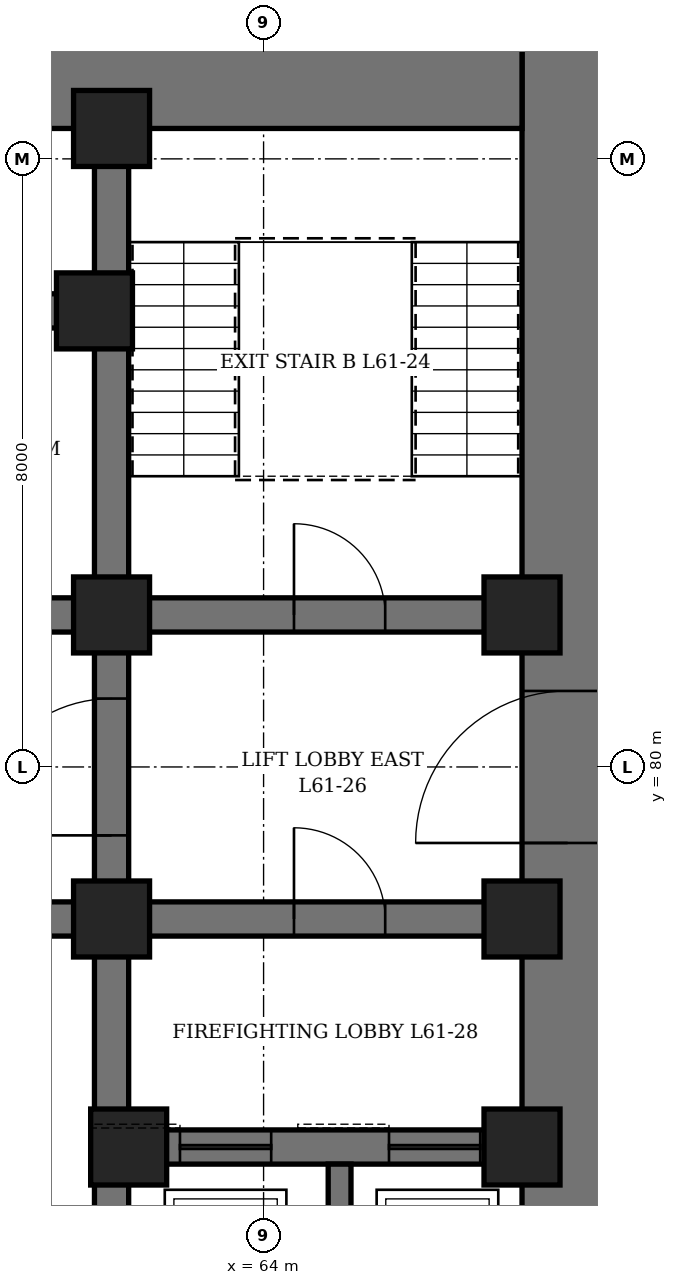
"""IFC4 building model, lengths in metres.
Left out: names, types, materials, properties, quantities, classifications, styles, units other than length and angle.
Written with IfcOpenShell. Run it as: python <this file> out.ifc"""

import sys

from ifc_helpers import new_model, si_unit, direction, frame, frame_2d, origin, origin_2d, place, context, subcontext, project, spatial, rectangle, hollow_rectangle, extrude, element, fill, save


model = new_model("IFC4")
c1 = context("Model", 3, precision=1e-05, world=origin(), true_north=direction((0.0, 1.0)))
c2 = subcontext(c1, "Body", "Model", "MODEL_VIEW")
j1 = project(units=[si_unit("LENGTHUNIT", "METRE"), si_unit("PLANEANGLEUNIT", "RADIAN")], contexts=[c1])
p1 = place(None, origin())
s1 = spatial("IfcSite", under=j1, at=p1, CompositionType="ELEMENT")
p2 = place(p1, origin())
s2 = spatial("IfcBuilding", under=s1, at=p2, CompositionType="ELEMENT")
p3 = place(p2, frame((0.0, 0.0, 271.3)))
s3 = spatial("IfcBuildingStorey", under=s2, at=p3, CompositionType="ELEMENT", Elevation=271.3)
p4 = place(p3, frame((68.0, 70.4, 0.0), z_axis=(0.0, 0.0, 1.0), x_axis=(0.0, 1.0, 0.0)))
e1 = element("IfcWall", 1, at=p4, inside=s3, PredefinedType="SHEAR", context=c2, shape_type="SweptSolid", body=[
    extrude(rectangle(XDim=19.2, YDim=1.2, at=frame_2d((9.6, 0.0))), origin(), (0.0, 0.0, 1.0), 4.2),
])
p5 = place(p4, frame((8.6, 0.0, 0.0)))
e2 = element("IfcOpeningElement", 2, at=p5, cuts=e1, PredefinedType="OPENING", context=c2, shape_type="SweptSolid", body=[
    extrude(rectangle(XDim=2.0, YDim=2.4, at=frame_2d((1.0, 1.2))), frame((0.0, 0.61, 0.0), z_axis=(0.0, -1.0, 0.0), x_axis=(1.0, 0.0, 0.0)), (0.0, 0.0, 1.0), 1.22),
])
p6 = place(p3, frame((44.6, 89.0, 0.0), z_axis=(0.0, 0.0, 1.0), x_axis=(1.0, 0.0, 0.0)))
e3 = element("IfcWall", 3, at=p6, inside=s3, PredefinedType="SHEAR", context=c2, shape_type="SweptSolid", body=[
    extrude(rectangle(XDim=22.8, YDim=1.2, at=frame_2d((11.4, 0.0))), origin(), (0.0, 0.0, 1.0), 4.2),
])
p7 = place(p6, frame((6.525, 0.0, 0.0)))
e4 = element("IfcOpeningElement", 4, at=p7, cuts=e3, PredefinedType="OPENING", context=c2, shape_type="SweptSolid", body=[
    extrude(rectangle(XDim=1.0, YDim=2.1, at=frame_2d((0.5, 1.05))), frame((0.0, 0.61, 0.0), z_axis=(0.0, -1.0, 0.0), x_axis=(1.0, 0.0, 0.0)), (0.0, 0.0, 1.0), 1.22),
])
p8 = place(p6, frame((9.45, 0.0, 0.0)))
e5 = element("IfcOpeningElement", 5, at=p8, cuts=e3, PredefinedType="OPENING", context=c2, shape_type="SweptSolid", body=[
    extrude(rectangle(XDim=0.9, YDim=2.1, at=frame_2d((0.45, 1.05))), frame((0.0, 0.61, 0.0), z_axis=(0.0, -1.0, 0.0), x_axis=(1.0, 0.0, 0.0)), (0.0, 0.0, 1.0), 1.22),
])
p9 = place(p6, frame((13.012, 0.0, 0.0)))
e6 = element("IfcOpeningElement", 6, at=p9, cuts=e3, PredefinedType="OPENING", context=c2, shape_type="SweptSolid", body=[
    extrude(rectangle(XDim=0.9, YDim=2.1, at=frame_2d((0.45, 1.05))), frame((0.0, 0.61, 0.0), z_axis=(0.0, -1.0, 0.0), x_axis=(1.0, 0.0, 0.0)), (0.0, 0.0, 1.0), 1.22),
])
p10 = place(p3, frame((62.0, 71.6, 0.0), z_axis=(0.0, 0.0, 1.0), x_axis=(0.0, 1.0, 0.0)))
e7 = element("IfcWall", 7, at=p10, inside=s3, PredefinedType="SHEAR", context=c2, shape_type="SweptSolid", body=[
    extrude(rectangle(XDim=16.8, YDim=0.45, at=frame_2d((8.4, 0.0))), origin(), (0.0, 0.0, 1.0), 4.2),
])
p11 = place(p10, frame((7.5, 0.0, 0.0)))
e8 = element("IfcOpeningElement", 8, at=p11, cuts=e7, PredefinedType="OPENING", context=c2, shape_type="SweptSolid", body=[
    extrude(rectangle(XDim=1.8, YDim=2.4, at=frame_2d((0.9, 1.2))), frame((0.0, 0.235, 0.0), z_axis=(0.0, -1.0, 0.0), x_axis=(1.0, 0.0, 0.0)), (0.0, 0.0, 1.0), 0.47),
])
p12 = place(p3, frame((62.225, 75.0, 0.0), z_axis=(0.0, 0.0, 1.0), x_axis=(1.0, 0.0, 0.0)))
e9 = element("IfcWall", 9, at=p12, inside=s3, PredefinedType="SHEAR", context=c2, shape_type="SweptSolid", body=[
    extrude(rectangle(XDim=5.175, YDim=0.45, at=frame_2d((2.587, 0.0))), origin(), (0.0, 0.0, 1.0), 4.2),
])
p13 = place(p12, frame((0.675, 0.0, 0.0)))
e10 = element("IfcOpeningElement", 10, at=p13, cuts=e9, PredefinedType="OPENING", context=c2, shape_type="SweptSolid", body=[
    extrude(rectangle(XDim=1.2, YDim=2.2, at=frame_2d((0.6, 1.1))), frame((0.0, 0.235, 0.0), z_axis=(0.0, -1.0, 0.0), x_axis=(1.0, 0.0, 0.0)), (0.0, 0.0, 1.0), 0.47),
])
p14 = place(p12, frame((3.425, 0.0, 0.0)))
e11 = element("IfcOpeningElement", 11, at=p14, cuts=e9, PredefinedType="OPENING", context=c2, shape_type="SweptSolid", body=[
    extrude(rectangle(XDim=1.2, YDim=2.2, at=frame_2d((0.6, 1.1))), frame((0.0, 0.235, 0.0), z_axis=(0.0, -1.0, 0.0), x_axis=(1.0, 0.0, 0.0)), (0.0, 0.0, 1.0), 0.47),
])
p15 = place(p3, frame((62.225, 78.0, 0.0), z_axis=(0.0, 0.0, 1.0), x_axis=(1.0, 0.0, 0.0)))
e12 = element("IfcWall", 12, at=p15, inside=s3, PredefinedType="SHEAR", context=c2, shape_type="SweptSolid", body=[
    extrude(rectangle(XDim=5.175, YDim=0.45, at=frame_2d((2.587, 0.0))), origin(), (0.0, 0.0, 1.0), 4.2),
])
p16 = place(p15, frame((2.175, 0.0, 0.0)))
e13 = element("IfcOpeningElement", 13, at=p16, cuts=e12, PredefinedType="OPENING", context=c2, shape_type="SweptSolid", body=[
    extrude(rectangle(XDim=1.2, YDim=2.1, at=frame_2d((0.6, 1.05))), frame((0.0, 0.235, 0.0), z_axis=(0.0, -1.0, 0.0), x_axis=(1.0, 0.0, 0.0)), (0.0, 0.0, 1.0), 0.47),
])
p17 = place(p3, frame((62.225, 82.0, 0.0), z_axis=(0.0, 0.0, 1.0), x_axis=(1.0, 0.0, 0.0)))
e14 = element("IfcWall", 14, at=p17, inside=s3, PredefinedType="SHEAR", context=c2, shape_type="SweptSolid", body=[
    extrude(rectangle(XDim=5.175, YDim=0.45, at=frame_2d((2.587, 0.0))), origin(), (0.0, 0.0, 1.0), 4.2),
])
p18 = place(p17, frame((2.175, 0.0, 0.0)))
e15 = element("IfcOpeningElement", 15, at=p18, cuts=e14, PredefinedType="OPENING", context=c2, shape_type="SweptSolid", body=[
    extrude(rectangle(XDim=1.2, YDim=2.1, at=frame_2d((0.6, 1.05))), frame((0.0, 0.235, 0.0), z_axis=(0.0, -1.0, 0.0), x_axis=(1.0, 0.0, 0.0)), (0.0, 0.0, 1.0), 0.47),
])
p19 = place(p3, frame((50.225, 78.0, 0.0), z_axis=(0.0, 0.0, 1.0), x_axis=(1.0, 0.0, 0.0)))
e16 = element("IfcWall", 16, at=p19, inside=s3, PredefinedType="SHEAR", context=c2, shape_type="SweptSolid", body=[
    extrude(rectangle(XDim=11.55, YDim=0.45, at=frame_2d((5.775, 0.0))), origin(), (0.0, 0.0, 1.0), 4.2),
])
p20 = place(p19, frame((0.825, 0.0, 0.0)))
e17 = element("IfcOpeningElement", 17, at=p20, cuts=e16, PredefinedType="OPENING", context=c2, shape_type="SweptSolid", body=[
    extrude(rectangle(XDim=0.9, YDim=2.1, at=frame_2d((0.45, 1.05))), frame((0.0, 0.235, 0.0), z_axis=(0.0, -1.0, 0.0), x_axis=(1.0, 0.0, 0.0)), (0.0, 0.0, 1.0), 0.47),
])
p21 = place(p19, frame((3.825, 0.0, 0.0)))
e18 = element("IfcOpeningElement", 18, at=p21, cuts=e16, PredefinedType="OPENING", context=c2, shape_type="SweptSolid", body=[
    extrude(rectangle(XDim=0.9, YDim=2.1, at=frame_2d((0.45, 1.05))), frame((0.0, 0.235, 0.0), z_axis=(0.0, -1.0, 0.0), x_axis=(1.0, 0.0, 0.0)), (0.0, 0.0, 1.0), 0.47),
])
p22 = place(p19, frame((6.825, 0.0, 0.0)))
e19 = element("IfcOpeningElement", 19, at=p22, cuts=e16, PredefinedType="OPENING", context=c2, shape_type="SweptSolid", body=[
    extrude(rectangle(XDim=0.9, YDim=2.1, at=frame_2d((0.45, 1.05))), frame((0.0, 0.235, 0.0), z_axis=(0.0, -1.0, 0.0), x_axis=(1.0, 0.0, 0.0)), (0.0, 0.0, 1.0), 0.47),
])
p23 = place(p19, frame((9.825, 0.0, 0.0)))
e20 = element("IfcOpeningElement", 20, at=p23, cuts=e16, PredefinedType="OPENING", context=c2, shape_type="SweptSolid", body=[
    extrude(rectangle(XDim=0.9, YDim=2.1, at=frame_2d((0.45, 1.05))), frame((0.0, 0.235, 0.0), z_axis=(0.0, -1.0, 0.0), x_axis=(1.0, 0.0, 0.0)), (0.0, 0.0, 1.0), 0.47),
])
p24 = place(p3, frame((50.225, 82.0, 0.0), z_axis=(0.0, 0.0, 1.0), x_axis=(1.0, 0.0, 0.0)))
e21 = element("IfcWall", 21, at=p24, inside=s3, PredefinedType="SHEAR", context=c2, shape_type="SweptSolid", body=[
    extrude(rectangle(XDim=11.55, YDim=0.45, at=frame_2d((5.775, 0.0))), origin(), (0.0, 0.0, 1.0), 4.2),
])
p25 = place(p24, frame((0.825, 0.0, 0.0)))
e22 = element("IfcOpeningElement", 22, at=p25, cuts=e21, PredefinedType="OPENING", context=c2, shape_type="SweptSolid", body=[
    extrude(rectangle(XDim=0.9, YDim=2.1, at=frame_2d((0.45, 1.05))), frame((0.0, 0.235, 0.0), z_axis=(0.0, -1.0, 0.0), x_axis=(1.0, 0.0, 0.0)), (0.0, 0.0, 1.0), 0.47),
])
p26 = place(p24, frame((3.825, 0.0, 0.0)))
e23 = element("IfcOpeningElement", 23, at=p26, cuts=e21, PredefinedType="OPENING", context=c2, shape_type="SweptSolid", body=[
    extrude(rectangle(XDim=0.9, YDim=2.1, at=frame_2d((0.45, 1.05))), frame((0.0, 0.235, 0.0), z_axis=(0.0, -1.0, 0.0), x_axis=(1.0, 0.0, 0.0)), (0.0, 0.0, 1.0), 0.47),
])
p27 = place(p24, frame((6.825, 0.0, 0.0)))
e24 = element("IfcOpeningElement", 24, at=p27, cuts=e21, PredefinedType="OPENING", context=c2, shape_type="SweptSolid", body=[
    extrude(rectangle(XDim=0.9, YDim=2.1, at=frame_2d((0.45, 1.05))), frame((0.0, 0.235, 0.0), z_axis=(0.0, -1.0, 0.0), x_axis=(1.0, 0.0, 0.0)), (0.0, 0.0, 1.0), 0.47),
])
p28 = place(p24, frame((9.825, 0.0, 0.0)))
e25 = element("IfcOpeningElement", 25, at=p28, cuts=e21, PredefinedType="OPENING", context=c2, shape_type="SweptSolid", body=[
    extrude(rectangle(XDim=0.9, YDim=2.1, at=frame_2d((0.45, 1.05))), frame((0.0, 0.235, 0.0), z_axis=(0.0, -1.0, 0.0), x_axis=(1.0, 0.0, 0.0)), (0.0, 0.0, 1.0), 0.47),
])
p29 = place(p3, frame((50.225, 86.0, 0.0), z_axis=(0.0, 0.0, 1.0), x_axis=(1.0, 0.0, 0.0)))
e26 = element("IfcWall", 26, at=p29, inside=s3, PredefinedType="SHEAR", context=c2, shape_type="SweptSolid", body=[
    extrude(rectangle(XDim=11.55, YDim=0.45, at=frame_2d((5.775, 0.0))), origin(), (0.0, 0.0, 1.0), 4.2),
])
p30 = place(p3, frame((65.0, 71.6, 0.0), z_axis=(0.0, 0.0, 1.0), x_axis=(0.0, 1.0, 0.0)))
e27 = element("IfcWall", 27, at=p30, inside=s3, PredefinedType="SHEAR", context=c2, shape_type="SweptSolid", body=[
    extrude(rectangle(XDim=3.175, YDim=0.3, at=frame_2d((1.587, 0.0))), origin(), (0.0, 0.0, 1.0), 4.2),
])
for number, where, z_axis, x_axis in (
    (28, (61.775, 86.0, 0.0), (0.0, 0.0, 1.0), (1.0, 0.0, 0.0)),
    (29, (62.0, 78.0, 0.0), (0.0, 0.0, 1.0), (1.0, 0.0, 0.0)),
    (30, (62.0, 82.0, 0.0), (0.0, 0.0, 1.0), (1.0, 0.0, 0.0)),
    (31, (62.0, 88.4, 0.0), (0.0, 0.0, 1.0), (1.0, 0.0, 0.0)),
    (32, (62.225, 75.0, 0.0), (0.0, 0.0, 1.0), (1.0, 0.0, 0.0)),
    (33, (67.4, 75.0, 0.0), (0.0, 0.0, 1.0), (1.0, 0.0, 0.0)),
    (34, (67.4, 78.0, 0.0), (0.0, 0.0, 1.0), (1.0, 0.0, 0.0)),
    (35, (67.4, 82.0, 0.0), (0.0, 0.0, 1.0), (1.0, 0.0, 0.0)),
):
    element("IfcColumn", number, at=place(p3, frame(where, z_axis=z_axis, x_axis=x_axis)), inside=s3, PredefinedType="COLUMN", context=c2, shape_type="SweptSolid", body=[
        extrude(hollow_rectangle(XDim=1.0, YDim=1.0, WallThickness=0.15, at=origin_2d()), origin(), (0.0, 0.0, 1.0), 4.2),
    ])
p31 = place(p18, origin())
e36 = element("IfcDoor", 36, at=p31, inside=s3, OperationType="SINGLE_SWING_LEFT", PredefinedType="DOOR", context=c2, shape_type="SweptSolid", body=[
    extrude(rectangle(XDim=1.2, YDim=2.1, at=frame_2d((0.6, 1.05))), frame((0.0, 0.225, 0.0), z_axis=(0.0, -1.0, 0.0), x_axis=(1.0, 0.0, 0.0)), (0.0, 0.0, 1.0), 0.449),
])
fill(e15, e36)
p32 = place(p5, origin())
e37 = element("IfcDoor", 37, at=p32, inside=s3, OperationType="DOUBLE_DOOR_SINGLE_SWING", PredefinedType="DOOR", context=c2, shape_type="SweptSolid", body=[
    extrude(rectangle(XDim=2.0, YDim=2.4, at=frame_2d((1.0, 1.2))), frame((0.0, 0.35, 0.0), z_axis=(0.0, -1.0, 0.0), x_axis=(1.0, 0.0, 0.0)), (0.0, 0.0, 1.0), 0.7),
])
fill(e2, e37)
p33 = place(p11, origin())
e38 = element("IfcDoor", 38, at=p33, inside=s3, OperationType="DOUBLE_DOOR_SINGLE_SWING", PredefinedType="DOOR", context=c2, shape_type="SweptSolid", body=[
    extrude(rectangle(XDim=1.8, YDim=2.4, at=frame_2d((0.9, 1.2))), frame((0.0, 0.225, 0.0), z_axis=(0.0, -1.0, 0.0), x_axis=(1.0, 0.0, 0.0)), (0.0, 0.0, 1.0), 0.449),
])
fill(e8, e38)
p34 = place(p16, origin())
e39 = element("IfcDoor", 39, at=p34, inside=s3, OperationType="SINGLE_SWING_RIGHT", PredefinedType="DOOR", context=c2, shape_type="SweptSolid", body=[
    extrude(rectangle(XDim=1.2, YDim=2.1, at=frame_2d((0.6, 1.05))), frame((0.0, 0.225, 0.0), z_axis=(0.0, -1.0, 0.0), x_axis=(1.0, 0.0, 0.0)), (0.0, 0.0, 1.0), 0.449),
])
fill(e13, e39)
p35 = place(p13, origin())
e40 = element("IfcDoor", 40, at=p35, inside=s3, OperationType="SLIDING_TO_LEFT", PredefinedType="DOOR", context=c2, shape_type="SweptSolid", body=[
    extrude(rectangle(XDim=1.2, YDim=2.2, at=frame_2d((0.6, 1.1))), frame((0.0, 0.225, 0.0), z_axis=(0.0, -1.0, 0.0), x_axis=(1.0, 0.0, 0.0)), (0.0, 0.0, 1.0), 0.449),
])
fill(e10, e40)
p36 = place(p14, origin())
e41 = element("IfcDoor", 41, at=p36, inside=s3, OperationType="SLIDING_TO_LEFT", PredefinedType="DOOR", context=c2, shape_type="SweptSolid", body=[
    extrude(rectangle(XDim=1.2, YDim=2.2, at=frame_2d((0.6, 1.1))), frame((0.0, 0.225, 0.0), z_axis=(0.0, -1.0, 0.0), x_axis=(1.0, 0.0, 0.0)), (0.0, 0.0, 1.0), 0.449),
])
fill(e11, e41)
save(model, sys.argv[1])
